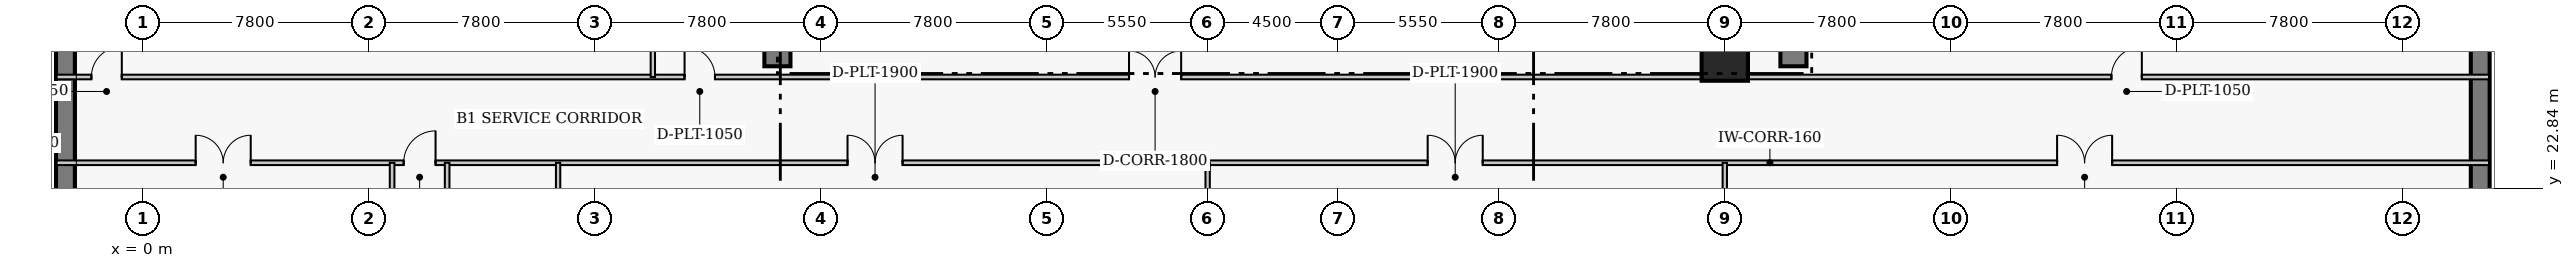
"""IFC4 building model, lengths in metres.
Left out: names, types, materials, properties, quantities, classifications, styles, units other than length and angle.
Written with IfcOpenShell. Run it as: python <this file> out.ifc"""

import sys

from ifc_helpers import new_model, si_unit, direction, frame, frame_2d, origin, origin_2d, place, context, subcontext, project, spatial, rectangle, extrude, element, fill, save


model = new_model("IFC4")
c1 = context("Model", 3, precision=1e-05, world=origin(), true_north=direction((0.0, 1.0)))
c2 = subcontext(c1, "Body", "Model", "MODEL_VIEW")
j1 = project(units=[si_unit("LENGTHUNIT", "METRE"), si_unit("PLANEANGLEUNIT", "RADIAN")], contexts=[c1])
p1 = place(None, origin())
s1 = spatial("IfcSite", under=j1, at=p1, CompositionType="ELEMENT")
p2 = place(p1, origin())
s2 = spatial("IfcBuilding", under=s1, at=p2, CompositionType="ELEMENT")
p3 = place(p2, frame((0.0, 0.0, -4.5)))
s3 = spatial("IfcBuildingStorey", under=s2, at=p3, CompositionType="ELEMENT", Elevation=-4.5)
for number, where, z_axis, x_axis in (
    (1, (80.675, 2.58, 0.0), (0.0, 0.0, 1.0), (0.0, 1.0, 0.0)),
    (2, (-2.675, 49.42, 0.0), (0.0, 0.0, 1.0), (0.0, -1.0, 0.0)),
):
    element("IfcWall", number, at=place(p3, frame(where, z_axis=z_axis, x_axis=x_axis)), inside=s3, PredefinedType="USERDEFINED", context=c2, shape_type="SweptSolid", body=[
        extrude(rectangle(XDim=46.84, YDim=0.65, at=frame_2d((23.42, 0.0))), origin(), (0.0, 0.0, 1.0), 4.15),
    ])
for number, where, z_axis, x_axis in (
    (3, (21.9, 27.05, 0.0), (0.0, 0.0, 1.0), (0.0, 1.0, 0.0)),
    (4, (56.97, 27.05, 0.0), (0.0, 0.0, 1.0), (0.0, 1.0, 0.0)),
):
    element("IfcWall", number, at=place(p3, frame(where, z_axis=z_axis, x_axis=x_axis)), inside=s3, PredefinedType="SHEAR", context=c2, shape_type="SweptSolid", body=[
        extrude(rectangle(XDim=13.72, YDim=0.9, at=frame_2d((6.86, 0.0))), origin(), (0.0, 0.0, 1.0), 4.5),
    ])
p4 = place(p3, frame((54.6, 27.35, 0.0), z_axis=(0.0, 0.0, 1.0), x_axis=(1.0, 0.0, 0.0)))
e5 = element("IfcColumn", 5, at=p4, inside=s3, PredefinedType="COLUMN", context=c2, shape_type="SweptSolid", body=[
    extrude(rectangle(XDim=1.6, YDim=1.6, at=origin_2d()), origin(), (0.0, 0.0, 1.0), 4.5),
])
p5 = place(p3, frame((-2.98, 23.72, 0.0), z_axis=(0.0, 0.0, 1.0), x_axis=(1.0, 0.0, 0.0)))
e6 = element("IfcWall", 6, at=p5, inside=s3, PredefinedType="PARTITIONING", context=c2, shape_type="SweptSolid", body=[
    extrude(rectangle(XDim=83.96, YDim=0.16, at=frame_2d((41.98, 0.0))), origin(), (0.0, 0.0, 1.0), 4.15),
])
p6 = place(p5, frame((11.98, 0.0, 0.0)))
e7 = element("IfcOpeningElement", 7, at=p6, cuts=e6, PredefinedType="OPENING", context=c2, shape_type="SweptSolid", body=[
    extrude(rectangle(XDim=1.1, YDim=2.15, at=frame_2d((0.55, 1.075))), frame((0.0, 0.09, 0.0), z_axis=(0.0, -1.0, 0.0), x_axis=(1.0, 0.0, 0.0)), (0.0, 0.0, 1.0), 0.18),
])
p7 = place(p5, frame((4.8, 0.0, 0.0)))
e8 = element("IfcOpeningElement", 8, at=p7, cuts=e6, PredefinedType="OPENING", context=c2, shape_type="SweptSolid", body=[
    extrude(rectangle(XDim=1.9, YDim=2.25, at=frame_2d((0.95, 1.125))), frame((0.0, 0.09, 0.0), z_axis=(0.0, -1.0, 0.0), x_axis=(1.0, 0.0, 0.0)), (0.0, 0.0, 1.0), 0.18),
])
p8 = place(p5, frame((27.3, 0.0, 0.0)))
e9 = element("IfcOpeningElement", 9, at=p8, cuts=e6, PredefinedType="OPENING", context=c2, shape_type="SweptSolid", body=[
    extrude(rectangle(XDim=1.9, YDim=2.25, at=frame_2d((0.95, 1.125))), frame((0.0, 0.09, 0.0), z_axis=(0.0, -1.0, 0.0), x_axis=(1.0, 0.0, 0.0)), (0.0, 0.0, 1.0), 0.18),
])
p9 = place(p5, frame((47.325, 0.0, 0.0)))
e10 = element("IfcOpeningElement", 10, at=p9, cuts=e6, PredefinedType="OPENING", context=c2, shape_type="SweptSolid", body=[
    extrude(rectangle(XDim=1.9, YDim=2.25, at=frame_2d((0.95, 1.125))), frame((0.0, 0.09, 0.0), z_axis=(0.0, -1.0, 0.0), x_axis=(1.0, 0.0, 0.0)), (0.0, 0.0, 1.0), 0.18),
])
p10 = place(p5, frame((69.05, 0.0, 0.0)))
e11 = element("IfcOpeningElement", 11, at=p10, cuts=e6, PredefinedType="OPENING", context=c2, shape_type="SweptSolid", body=[
    extrude(rectangle(XDim=1.9, YDim=2.25, at=frame_2d((0.95, 1.125))), frame((0.0, 0.09, 0.0), z_axis=(0.0, -1.0, 0.0), x_axis=(1.0, 0.0, 0.0)), (0.0, 0.0, 1.0), 0.18),
])
p11 = place(p3, frame((-2.98, 26.68, 0.0), z_axis=(0.0, 0.0, 1.0), x_axis=(1.0, 0.0, 0.0)))
e12 = element("IfcWall", 12, at=p11, inside=s3, PredefinedType="PARTITIONING", context=c2, shape_type="SweptSolid", body=[
    extrude(rectangle(XDim=83.96, YDim=0.16, at=frame_2d((41.98, 0.0))), origin(), (0.0, 0.0, 1.0), 4.15),
])
p12 = place(p11, frame((37.016, 0.0, 0.0)))
e13 = element("IfcOpeningElement", 13, at=p12, cuts=e12, PredefinedType="OPENING", context=c2, shape_type="SweptSolid", body=[
    extrude(rectangle(XDim=1.8, YDim=2.2, at=frame_2d((0.9, 1.1))), frame((0.0, 0.09, 0.0), z_axis=(0.0, -1.0, 0.0), x_axis=(1.0, 0.0, 0.0)), (0.0, 0.0, 1.0), 0.18),
])
p13 = place(p11, frame((1.2, 0.0, 0.0)))
e14 = element("IfcOpeningElement", 14, at=p13, cuts=e12, PredefinedType="OPENING", context=c2, shape_type="SweptSolid", body=[
    extrude(rectangle(XDim=1.05, YDim=2.15, at=frame_2d((0.525, 1.075))), frame((0.0, 0.09, 0.0), z_axis=(0.0, -1.0, 0.0), x_axis=(1.0, 0.0, 0.0)), (0.0, 0.0, 1.0), 0.18),
])
p14 = place(p11, frame((21.675, 0.0, 0.0)))
e15 = element("IfcOpeningElement", 15, at=p14, cuts=e12, PredefinedType="OPENING", context=c2, shape_type="SweptSolid", body=[
    extrude(rectangle(XDim=1.05, YDim=2.15, at=frame_2d((0.525, 1.075))), frame((0.0, 0.09, 0.0), z_axis=(0.0, -1.0, 0.0), x_axis=(1.0, 0.0, 0.0)), (0.0, 0.0, 1.0), 0.18),
])
p15 = place(p11, frame((70.925, 0.0, 0.0)))
e16 = element("IfcOpeningElement", 16, at=p15, cuts=e12, PredefinedType="OPENING", context=c2, shape_type="SweptSolid", body=[
    extrude(rectangle(XDim=1.05, YDim=2.15, at=frame_2d((0.525, 1.075))), frame((0.0, 0.09, 0.0), z_axis=(0.0, -1.0, 0.0), x_axis=(1.0, 0.0, 0.0)), (0.0, 0.0, 1.0), 0.18),
])
p16 = place(p3, frame((8.6, 3.0, 0.0), z_axis=(0.0, 0.0, 1.0), x_axis=(0.0, 1.0, 0.0)))
e17 = element("IfcWall", 17, at=p16, inside=s3, PredefinedType="PARTITIONING", context=c2, shape_type="SweptSolid", body=[
    extrude(rectangle(XDim=20.72, YDim=0.16, at=frame_2d((10.36, 0.0))), origin(), (0.0, 0.0, 1.0), 4.15),
])
p17 = place(p3, frame((10.5, 10.95, 0.0), z_axis=(0.0, 0.0, 1.0), x_axis=(0.0, 1.0, 0.0)))
e18 = element("IfcWall", 18, at=p17, inside=s3, PredefinedType="PARTITIONING", context=c2, shape_type="SweptSolid", body=[
    extrude(rectangle(XDim=12.77, YDim=0.16, at=frame_2d((6.385, 0.0))), origin(), (0.0, 0.0, 1.0), 4.15),
])
p18 = place(p3, frame((14.33, 10.95, 0.0), z_axis=(0.0, 0.0, 1.0), x_axis=(0.0, 1.0, 0.0)))
e19 = element("IfcWall", 19, at=p18, inside=s3, PredefinedType="PARTITIONING", context=c2, shape_type="SweptSolid", body=[
    extrude(rectangle(XDim=12.77, YDim=0.15, at=frame_2d((6.385, 0.0))), origin(), (0.0, 0.0, 1.0), 4.15),
])
for number, where, z_axis, x_axis in (
    (20, (36.75, 0.42, 0.0), (0.0, 0.0, 1.0), (0.0, 1.0, 0.0)),
    (21, (54.6, 0.42, 0.0), (0.0, 0.0, 1.0), (0.0, 1.0, 0.0)),
):
    element("IfcWall", number, at=place(p3, frame(where, z_axis=z_axis, x_axis=x_axis)), inside=s3, PredefinedType="PARTITIONING", context=c2, shape_type="SweptSolid", body=[
        extrude(rectangle(XDim=23.3, YDim=0.15, at=frame_2d((11.65, 0.0))), origin(), (0.0, 0.0, 1.0), 3.11),
    ])
p19 = place(p3, frame((17.6, 26.68, 0.0), z_axis=(0.0, 0.0, 1.0), x_axis=(0.0, 1.0, 0.0)))
e22 = element("IfcWall", 22, at=p19, inside=s3, PredefinedType="PARTITIONING", context=c2, shape_type="SweptSolid", body=[
    extrude(rectangle(XDim=24.9, YDim=0.15, at=frame_2d((12.45, 0.0))), origin(), (0.0, 0.0, 1.0), 4.15),
])
p20 = place(p12, origin())
e23 = element("IfcDoor", 23, at=p20, inside=s3, OperationType="DOUBLE_DOOR_SINGLE_SWING", PredefinedType="DOOR", context=c2, shape_type="SweptSolid", body=[
    extrude(rectangle(XDim=1.8, YDim=2.2, at=frame_2d((0.9, 1.1))), frame((0.0, 0.025, 0.0), z_axis=(0.0, -1.0, 0.0), x_axis=(1.0, 0.0, 0.0)), (0.0, 0.0, 1.0), 0.05),
])
fill(e13, e23)
p21 = place(p6, origin())
e24 = element("IfcDoor", 24, at=p21, inside=s3, OperationType="SINGLE_SWING_RIGHT", PredefinedType="DOOR", context=c2, shape_type="SweptSolid", body=[
    extrude(rectangle(XDim=1.1, YDim=2.15, at=frame_2d((0.55, 1.075))), frame((0.0, 0.025, 0.0), z_axis=(0.0, -1.0, 0.0), x_axis=(1.0, 0.0, 0.0)), (0.0, 0.0, 1.0), 0.05),
])
fill(e7, e24)
p22 = place(p7, origin())
e25 = element("IfcDoor", 25, at=p22, inside=s3, OperationType="DOUBLE_DOOR_SINGLE_SWING", PredefinedType="DOOR", context=c2, shape_type="SweptSolid", body=[
    extrude(rectangle(XDim=1.9, YDim=2.25, at=frame_2d((0.95, 1.125))), frame((0.0, 0.025, 0.0), z_axis=(0.0, -1.0, 0.0), x_axis=(1.0, 0.0, 0.0)), (0.0, 0.0, 1.0), 0.05),
])
fill(e8, e25)
p23 = place(p8, origin())
e26 = element("IfcDoor", 26, at=p23, inside=s3, OperationType="DOUBLE_DOOR_SINGLE_SWING", PredefinedType="DOOR", context=c2, shape_type="SweptSolid", body=[
    extrude(rectangle(XDim=1.9, YDim=2.25, at=frame_2d((0.95, 1.125))), frame((0.0, 0.025, 0.0), z_axis=(0.0, -1.0, 0.0), x_axis=(1.0, 0.0, 0.0)), (0.0, 0.0, 1.0), 0.05),
])
fill(e9, e26)
p24 = place(p9, origin())
e27 = element("IfcDoor", 27, at=p24, inside=s3, OperationType="DOUBLE_DOOR_SINGLE_SWING", PredefinedType="DOOR", context=c2, shape_type="SweptSolid", body=[
    extrude(rectangle(XDim=1.9, YDim=2.25, at=frame_2d((0.95, 1.125))), frame((0.0, 0.025, 0.0), z_axis=(0.0, -1.0, 0.0), x_axis=(1.0, 0.0, 0.0)), (0.0, 0.0, 1.0), 0.05),
])
fill(e10, e27)
p25 = place(p10, origin())
e28 = element("IfcDoor", 28, at=p25, inside=s3, OperationType="DOUBLE_DOOR_SINGLE_SWING", PredefinedType="DOOR", context=c2, shape_type="SweptSolid", body=[
    extrude(rectangle(XDim=1.9, YDim=2.25, at=frame_2d((0.95, 1.125))), frame((0.0, 0.025, 0.0), z_axis=(0.0, -1.0, 0.0), x_axis=(1.0, 0.0, 0.0)), (0.0, 0.0, 1.0), 0.05),
])
fill(e11, e28)
p26 = place(p13, origin())
e29 = element("IfcDoor", 29, at=p26, inside=s3, OperationType="SINGLE_SWING_RIGHT", PredefinedType="DOOR", context=c2, shape_type="SweptSolid", body=[
    extrude(rectangle(XDim=1.05, YDim=2.15, at=frame_2d((0.525, 1.075))), frame((0.0, 0.025, 0.0), z_axis=(0.0, -1.0, 0.0), x_axis=(1.0, 0.0, 0.0)), (0.0, 0.0, 1.0), 0.05),
])
fill(e14, e29)
p27 = place(p14, origin())
e30 = element("IfcDoor", 30, at=p27, inside=s3, OperationType="SINGLE_SWING_LEFT", PredefinedType="DOOR", context=c2, shape_type="SweptSolid", body=[
    extrude(rectangle(XDim=1.05, YDim=2.15, at=frame_2d((0.525, 1.075))), frame((0.0, 0.025, 0.0), z_axis=(0.0, -1.0, 0.0), x_axis=(1.0, 0.0, 0.0)), (0.0, 0.0, 1.0), 0.05),
])
fill(e15, e30)
p28 = place(p15, origin())
e31 = element("IfcDoor", 31, at=p28, inside=s3, OperationType="SINGLE_SWING_RIGHT", PredefinedType="DOOR", context=c2, shape_type="SweptSolid", body=[
    extrude(rectangle(XDim=1.05, YDim=2.15, at=frame_2d((0.525, 1.075))), frame((0.0, 0.025, 0.0), z_axis=(0.0, -1.0, 0.0), x_axis=(1.0, 0.0, 0.0)), (0.0, 0.0, 1.0), 0.05),
])
fill(e16, e31)
save(model, sys.argv[1])
